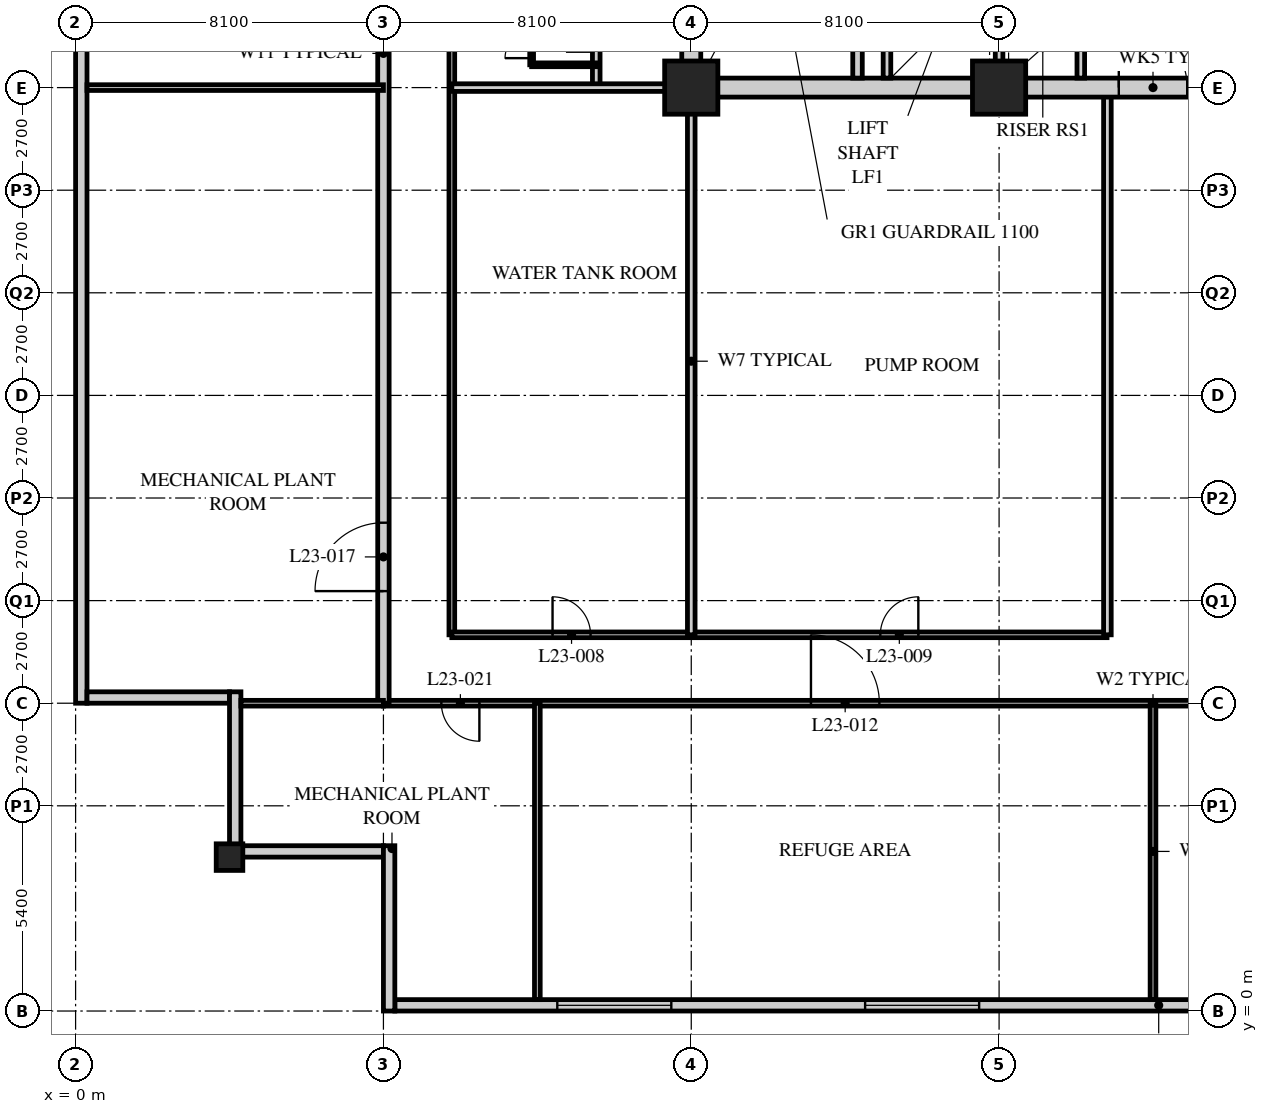
"""IFC4 building model, lengths in metres.
Left out: names, types, materials, properties, quantities, classifications, styles, units other than length and angle.
Written with IfcOpenShell. Run it as: python <this file> out.ifc"""

import sys

from ifc_helpers import new_model, si_unit, direction, frame, frame_2d, origin, origin_2d, place, context, subcontext, project, spatial, rectangle, hollow_rectangle, extrude, element, fill, save


model = new_model("IFC4")
c1 = context("Model", 3, precision=1e-05, world=origin(), true_north=direction((0.0, 1.0)))
c2 = subcontext(c1, "Body", "Model", "MODEL_VIEW")
j1 = project(units=[si_unit("LENGTHUNIT", "METRE"), si_unit("PLANEANGLEUNIT", "RADIAN")], contexts=[c1])
p1 = place(None, origin())
s1 = spatial("IfcSite", under=j1, at=p1, CompositionType="ELEMENT")
p2 = place(p1, origin())
s2 = spatial("IfcBuilding", under=s1, at=p2, CompositionType="ELEMENT")
p3 = place(p2, frame((0.0, 0.0, 90.8)))
s3 = spatial("IfcBuildingStorey", under=s2, at=p3, CompositionType="ELEMENT", Elevation=90.8)
p4 = place(p3, frame((4.05, 4.05, 0.0), z_axis=(0.0, 0.0, 1.0), x_axis=(1.0, 0.0, 0.0)))
e1 = element("IfcColumn", 1, at=p4, inside=s3, PredefinedType="COLUMN", context=c2, shape_type="SweptSolid", body=[
    extrude(hollow_rectangle(XDim=0.7, YDim=0.7, WallThickness=0.07, at=origin_2d()), origin(), (0.0, 0.0, 1.0), 7.2),
])
for number, where, z_axis, x_axis in (
    (2, (16.2, 24.3, 0.0), (0.0, 0.0, 1.0), (1.0, 0.0, 0.0)),
    (3, (24.3, 24.3, 0.0), (0.0, 0.0, 1.0), (1.0, 0.0, 0.0)),
):
    element("IfcColumn", number, at=place(p3, frame(where, z_axis=z_axis, x_axis=x_axis)), inside=s3, PredefinedType="COLUMN", context=c2, shape_type="SweptSolid", body=[
        extrude(hollow_rectangle(XDim=1.4, YDim=1.4, WallThickness=0.12, at=origin_2d()), origin(), (0.0, 0.0, 1.0), 7.2),
    ])
p5 = place(p3, frame((8.4, 0.15, 0.0), z_axis=(0.0, 0.0, 1.0), x_axis=(1.0, 0.0, 0.0)))
e4 = element("IfcWall", 4, at=p5, inside=s3, PredefinedType="SOLIDWALL", context=c2, shape_type="SweptSolid", body=[
    extrude(rectangle(XDim=40.2, YDim=0.3, at=frame_2d((20.1, 0.0))), origin(), (0.0, 0.0, 1.0), 5.85),
])
p6 = place(p5, frame((4.275, 0.0, 1.0)))
e5 = element("IfcOpeningElement", 5, at=p6, cuts=e4, PredefinedType="OPENING", context=c2, shape_type="SweptSolid", body=[
    extrude(rectangle(XDim=3.0, YDim=1.7, at=frame_2d((1.5, 0.85))), frame((0.0, 0.16, 0.0), z_axis=(0.0, -1.0, 0.0), x_axis=(1.0, 0.0, 0.0)), (0.0, 0.0, 1.0), 0.32),
])
p7 = place(p5, frame((12.375, 0.0, 1.0)))
e6 = element("IfcOpeningElement", 6, at=p7, cuts=e4, PredefinedType="OPENING", context=c2, shape_type="SweptSolid", body=[
    extrude(rectangle(XDim=3.0, YDim=1.7, at=frame_2d((1.5, 0.85))), frame((0.0, 0.16, 0.0), z_axis=(0.0, -1.0, 0.0), x_axis=(1.0, 0.0, 0.0)), (0.0, 0.0, 1.0), 0.32),
])
p8 = place(p5, frame((24.525, 0.0, 1.0)))
e7 = element("IfcOpeningElement", 7, at=p8, cuts=e4, PredefinedType="OPENING", context=c2, shape_type="SweptSolid", body=[
    extrude(rectangle(XDim=3.0, YDim=1.7, at=frame_2d((1.5, 0.85))), frame((0.0, 0.16, 0.0), z_axis=(0.0, -1.0, 0.0), x_axis=(1.0, 0.0, 0.0)), (0.0, 0.0, 1.0), 0.32),
])
p9 = place(p5, frame((32.625, 0.0, 1.0)))
e8 = element("IfcOpeningElement", 8, at=p9, cuts=e4, PredefinedType="OPENING", context=c2, shape_type="SweptSolid", body=[
    extrude(rectangle(XDim=3.0, YDim=1.7, at=frame_2d((1.5, 0.85))), frame((0.0, 0.16, 0.0), z_axis=(0.0, -1.0, 0.0), x_axis=(1.0, 0.0, 0.0)), (0.0, 0.0, 1.0), 0.32),
])
p10 = place(p3, frame((0.15, 40.2, 0.0), z_axis=(0.0, 0.0, 1.0), x_axis=(0.0, -1.0, 0.0)))
e9 = element("IfcWall", 9, at=p10, inside=s3, PredefinedType="SOLIDWALL", context=c2, shape_type="SweptSolid", body=[
    extrude(rectangle(XDim=32.1, YDim=0.3, at=frame_2d((16.05, 0.0))), origin(), (0.0, 0.0, 1.0), 5.85),
])
p11 = place(p3, frame((0.3, 8.25, 0.0), z_axis=(0.0, 0.0, 1.0), x_axis=(1.0, 0.0, 0.0)))
e10 = element("IfcWall", 10, at=p11, inside=s3, PredefinedType="SOLIDWALL", context=c2, shape_type="SweptSolid", body=[
    extrude(rectangle(XDim=3.75, YDim=0.3, at=frame_2d((1.875, 0.0))), origin(), (0.0, 0.0, 1.0), 6.95),
])
p12 = place(p3, frame((4.2, 8.4, 0.0), z_axis=(0.0, 0.0, 1.0), x_axis=(0.0, -1.0, 0.0)))
e11 = element("IfcWall", 11, at=p12, inside=s3, PredefinedType="SOLIDWALL", context=c2, shape_type="SweptSolid", body=[
    extrude(rectangle(XDim=4.35, YDim=0.3, at=frame_2d((2.175, 0.0))), origin(), (0.0, 0.0, 1.0), 6.25),
])
p13 = place(p3, frame((4.35, 4.2, 0.0), z_axis=(0.0, 0.0, 1.0), x_axis=(1.0, 0.0, 0.0)))
e12 = element("IfcWall", 12, at=p13, inside=s3, PredefinedType="SOLIDWALL", context=c2, shape_type="SweptSolid", body=[
    extrude(rectangle(XDim=3.75, YDim=0.3, at=frame_2d((1.875, 0.0))), origin(), (0.0, 0.0, 1.0), 6.25),
])
p14 = place(p3, frame((8.25, 4.35, 0.0), z_axis=(0.0, 0.0, 1.0), x_axis=(0.0, -1.0, 0.0)))
e13 = element("IfcWall", 13, at=p14, inside=s3, PredefinedType="SOLIDWALL", context=c2, shape_type="SweptSolid", body=[
    extrude(rectangle(XDim=4.35, YDim=0.3, at=frame_2d((2.175, 0.0))), origin(), (0.0, 0.0, 1.0), 5.85),
])
p15 = place(p3, frame((8.1, 8.1, 0.0), z_axis=(0.0, 0.0, 1.0), x_axis=(1.0, 0.0, 0.0)))
e14 = element("IfcWall", 14, at=p15, inside=s3, PredefinedType="PARTITIONING", context=c2, shape_type="SweptSolid", body=[
    extrude(rectangle(XDim=40.5, YDim=0.15, at=frame_2d((20.25, 0.0))), origin(), (0.0, 0.0, 1.0), 6.95),
])
p16 = place(p15, frame((11.25, 0.0, 0.0)))
e15 = element("IfcOpeningElement", 15, at=p16, cuts=e14, PredefinedType="OPENING", context=c2, shape_type="SweptSolid", body=[
    extrude(rectangle(XDim=1.8, YDim=2.4, at=frame_2d((0.9, 1.2))), frame((0.0, 0.085, 0.0), z_axis=(0.0, -1.0, 0.0), x_axis=(1.0, 0.0, 0.0)), (0.0, 0.0, 1.0), 0.17),
])
p17 = place(p15, frame((27.45, 0.0, 0.0)))
e16 = element("IfcOpeningElement", 16, at=p17, cuts=e14, PredefinedType="OPENING", context=c2, shape_type="SweptSolid", body=[
    extrude(rectangle(XDim=1.8, YDim=2.4, at=frame_2d((0.9, 1.2))), frame((0.0, 0.085, 0.0), z_axis=(0.0, -1.0, 0.0), x_axis=(1.0, 0.0, 0.0)), (0.0, 0.0, 1.0), 0.17),
])
p18 = place(p15, frame((1.525, 0.0, 0.0)))
e17 = element("IfcOpeningElement", 17, at=p18, cuts=e14, PredefinedType="OPENING", context=c2, shape_type="SweptSolid", body=[
    extrude(rectangle(XDim=1.0, YDim=2.1, at=frame_2d((0.5, 1.05))), frame((0.0, 0.085, 0.0), z_axis=(0.0, -1.0, 0.0), x_axis=(1.0, 0.0, 0.0)), (0.0, 0.0, 1.0), 0.17),
])
p19 = place(p15, frame((37.975, 0.0, 0.0)))
e18 = element("IfcOpeningElement", 18, at=p19, cuts=e14, PredefinedType="OPENING", context=c2, shape_type="SweptSolid", body=[
    extrude(rectangle(XDim=1.0, YDim=2.1, at=frame_2d((0.5, 1.05))), frame((0.0, 0.085, 0.0), z_axis=(0.0, -1.0, 0.0), x_axis=(1.0, 0.0, 0.0)), (0.0, 0.0, 1.0), 0.17),
])
p20 = place(p3, frame((8.1, 8.1, 0.0), z_axis=(0.0, 0.0, 1.0), x_axis=(0.0, 1.0, 0.0)))
e19 = element("IfcWall", 19, at=p20, inside=s3, PredefinedType="PARTITIONING", context=c2, shape_type="SweptSolid", body=[
    extrude(rectangle(XDim=34.2, YDim=0.3, at=frame_2d((17.1, 0.0))), origin(), (0.0, 0.0, 1.0), 5.85),
])
p21 = place(p20, frame((2.95, 0.0, 0.0)))
e20 = element("IfcOpeningElement", 20, at=p21, cuts=e19, PredefinedType="OPENING", context=c2, shape_type="SweptSolid", body=[
    extrude(rectangle(XDim=1.8, YDim=2.4, at=frame_2d((0.9, 1.2))), frame((0.0, 0.16, 0.0), z_axis=(0.0, -1.0, 0.0), x_axis=(1.0, 0.0, 0.0)), (0.0, 0.0, 1.0), 0.32),
])
p22 = place(p20, frame((27.3, 0.0, 0.0)))
e21 = element("IfcOpeningElement", 21, at=p22, cuts=e19, PredefinedType="OPENING", context=c2, shape_type="SweptSolid", body=[
    extrude(rectangle(XDim=1.8, YDim=2.4, at=frame_2d((0.9, 1.2))), frame((0.0, 0.16, 0.0), z_axis=(0.0, -1.0, 0.0), x_axis=(1.0, 0.0, 0.0)), (0.0, 0.0, 1.0), 0.32),
])
p23 = place(p3, frame((9.9, 40.5, 0.0), z_axis=(0.0, 0.0, 1.0), x_axis=(0.0, -1.0, 0.0)))
e22 = element("IfcWall", 22, at=p23, inside=s3, PredefinedType="PARTITIONING", context=c2, shape_type="SweptSolid", body=[
    extrude(rectangle(XDim=30.6, YDim=0.15, at=frame_2d((15.3, 0.0))), origin(), (0.0, 0.0, 1.0), 6.95),
])
p24 = place(p23, frame((13.975, 0.0, 0.0)))
e23 = element("IfcOpeningElement", 23, at=p24, cuts=e22, PredefinedType="OPENING", context=c2, shape_type="SweptSolid", body=[
    extrude(rectangle(XDim=0.85, YDim=2.1, at=frame_2d((0.425, 1.05))), frame((0.0, 0.085, 0.0), z_axis=(0.0, -1.0, 0.0), x_axis=(1.0, 0.0, 0.0)), (0.0, 0.0, 1.0), 0.17),
])
p25 = place(p23, frame((9.85, 0.0, 0.0)))
e24 = element("IfcOpeningElement", 24, at=p25, cuts=e22, PredefinedType="OPENING", context=c2, shape_type="SweptSolid", body=[
    extrude(rectangle(XDim=1.0, YDim=2.1, at=frame_2d((0.5, 1.05))), frame((0.0, 0.085, 0.0), z_axis=(0.0, -1.0, 0.0), x_axis=(1.0, 0.0, 0.0)), (0.0, 0.0, 1.0), 0.17),
])
p26 = place(p23, frame((5.875, 0.0, 0.0)))
e25 = element("IfcOpeningElement", 25, at=p26, cuts=e22, PredefinedType="OPENING", context=c2, shape_type="SweptSolid", body=[
    extrude(rectangle(XDim=0.85, YDim=2.1, at=frame_2d((0.425, 1.05))), frame((0.0, 0.085, 0.0), z_axis=(0.0, -1.0, 0.0), x_axis=(1.0, 0.0, 0.0)), (0.0, 0.0, 1.0), 0.17),
])
p27 = place(p23, frame((1.75, 0.0, 0.0)))
e26 = element("IfcOpeningElement", 26, at=p27, cuts=e22, PredefinedType="OPENING", context=c2, shape_type="SweptSolid", body=[
    extrude(rectangle(XDim=1.0, YDim=2.1, at=frame_2d((0.5, 1.05))), frame((0.0, 0.085, 0.0), z_axis=(0.0, -1.0, 0.0), x_axis=(1.0, 0.0, 0.0)), (0.0, 0.0, 1.0), 0.17),
])
p28 = place(p3, frame((9.9, 9.9, 0.0), z_axis=(0.0, 0.0, 1.0), x_axis=(1.0, 0.0, 0.0)))
e27 = element("IfcWall", 27, at=p28, inside=s3, PredefinedType="PARTITIONING", context=c2, shape_type="SweptSolid", body=[
    extrude(rectangle(XDim=17.24, YDim=0.15, at=frame_2d((8.62, 0.0))), origin(), (0.0, 0.0, 1.0), 6.95),
])
p29 = place(p28, frame((2.65, 0.0, 0.0)))
e28 = element("IfcOpeningElement", 28, at=p29, cuts=e27, PredefinedType="OPENING", context=c2, shape_type="SweptSolid", body=[
    extrude(rectangle(XDim=1.0, YDim=2.1, at=frame_2d((0.5, 1.05))), frame((0.0, 0.085, 0.0), z_axis=(0.0, -1.0, 0.0), x_axis=(1.0, 0.0, 0.0)), (0.0, 0.0, 1.0), 0.17),
])
p30 = place(p28, frame((11.275, 0.0, 0.0)))
e29 = element("IfcOpeningElement", 29, at=p30, cuts=e27, PredefinedType="OPENING", context=c2, shape_type="SweptSolid", body=[
    extrude(rectangle(XDim=1.0, YDim=2.1, at=frame_2d((0.5, 1.05))), frame((0.0, 0.085, 0.0), z_axis=(0.0, -1.0, 0.0), x_axis=(1.0, 0.0, 0.0)), (0.0, 0.0, 1.0), 0.17),
])
p31 = place(p3, frame((13.7, 24.3, 0.0), z_axis=(0.0, 0.0, 1.0), x_axis=(0.0, 1.0, 0.0)))
e30 = element("IfcWall", 30, at=p31, inside=s3, PredefinedType="SOLIDWALL", context=c2, shape_type="SweptSolid", body=[
    extrude(rectangle(XDim=3.6, YDim=0.2, at=frame_2d((1.8, 0.0))), origin(), (0.0, 0.0, 1.0), 6.95),
])
p32 = place(p3, frame((16.2, 9.9, 0.0), z_axis=(0.0, 0.0, 1.0), x_axis=(0.0, 1.0, 0.0)))
e31 = element("IfcWall", 31, at=p32, inside=s3, PredefinedType="SOLIDWALL", context=c2, shape_type="SweptSolid", body=[
    extrude(rectangle(XDim=14.4, YDim=0.2, at=frame_2d((7.2, 0.0))), origin(), (0.0, 0.0, 1.0), 5.85),
])
p33 = place(p3, frame((27.15, 9.9, 0.0), z_axis=(0.0, 0.0, 1.0), x_axis=(0.0, 1.0, 0.0)))
e32 = element("IfcWall", 32, at=p33, inside=s3, PredefinedType="SOLIDWALL", context=c2, shape_type="SweptSolid", body=[
    extrude(rectangle(XDim=14.4, YDim=0.2, at=frame_2d((7.2, 0.0))), origin(), (0.0, 0.0, 1.0), 6.95),
])
p34 = place(p3, frame((9.9, 24.3, 0.0), z_axis=(0.0, 0.0, 1.0), x_axis=(1.0, 0.0, 0.0)))
e33 = element("IfcWall", 33, at=p34, inside=s3, PredefinedType="SOLIDWALL", context=c2, shape_type="SweptSolid", body=[
    extrude(rectangle(XDim=6.3, YDim=0.2, at=frame_2d((3.15, 0.0))), origin(), (0.0, 0.0, 1.0), 5.85),
])
p35 = place(p3, frame((28.35, 8.1, 0.0), z_axis=(0.0, 0.0, 1.0), x_axis=(0.0, -1.0, 0.0)))
e34 = element("IfcWall", 34, at=p35, inside=s3, PredefinedType="PARTITIONING", context=c2, shape_type="SweptSolid", body=[
    extrude(rectangle(XDim=7.8, YDim=0.15, at=frame_2d((3.9, 0.0))), origin(), (0.0, 0.0, 1.0), 6.95),
])
p36 = place(p3, frame((8.1, 24.3, 0.0), z_axis=(0.0, 0.0, 1.0), x_axis=(-1.0, 0.0, 0.0)))
e35 = element("IfcWall", 35, at=p36, inside=s3, PredefinedType="PARTITIONING", context=c2, shape_type="SweptSolid", body=[
    extrude(rectangle(XDim=7.8, YDim=0.15, at=frame_2d((3.9, 0.0))), origin(), (0.0, 0.0, 1.0), 5.85),
])
p37 = place(p3, frame((4.35, 8.1, 0.0), z_axis=(0.0, 0.0, 1.0), x_axis=(1.0, 0.0, 0.0)))
e36 = element("IfcWall", 36, at=p37, inside=s3, PredefinedType="PARTITIONING", context=c2, shape_type="SweptSolid", body=[
    extrude(rectangle(XDim=3.75, YDim=0.15, at=frame_2d((1.875, 0.0))), origin(), (0.0, 0.0, 1.0), 6.95),
])
p38 = place(p3, frame((12.15, 8.1, 0.0), z_axis=(0.0, 0.0, 1.0), x_axis=(0.0, -1.0, 0.0)))
e37 = element("IfcWall", 37, at=p38, inside=s3, PredefinedType="PARTITIONING", context=c2, shape_type="SweptSolid", body=[
    extrude(rectangle(XDim=7.8, YDim=0.15, at=frame_2d((3.9, 0.0))), origin(), (0.0, 0.0, 1.0), 6.95),
])
p39 = place(p3, frame((12.0, 24.9, 0.0), z_axis=(0.0, 0.0, 1.0), x_axis=(0.0, 1.0, 0.0)))
e38 = element("IfcWall", 38, at=p39, inside=s3, PredefinedType="PARTITIONING", context=c2, shape_type="SweptSolid", body=[
    extrude(rectangle(XDim=1.05, YDim=0.1, at=frame_2d((0.525, 0.0))), origin(), (0.0, 0.0, 1.0), 6.95),
])
p40 = place(p39, frame((0.175, 0.0, 0.0)))
e39 = element("IfcOpeningElement", 39, at=p40, cuts=e38, PredefinedType="OPENING", context=c2, shape_type="SweptSolid", body=[
    extrude(rectangle(XDim=0.7, YDim=2.0, at=frame_2d((0.35, 1.0))), frame((0.0, 0.06, 0.0), z_axis=(0.0, -1.0, 0.0), x_axis=(1.0, 0.0, 0.0)), (0.0, 0.0, 1.0), 0.12),
])
p41 = place(p3, frame((12.0, 24.9, 0.0), z_axis=(0.0, 0.0, 1.0), x_axis=(1.0, 0.0, 0.0)))
e40 = element("IfcWall", 40, at=p41, inside=s3, PredefinedType="PARTITIONING", context=c2, shape_type="SweptSolid", body=[
    extrude(rectangle(XDim=1.7, YDim=0.1, at=frame_2d((0.85, 0.0))), origin(), (0.0, 0.0, 1.0), 6.95),
])
p42 = place(p3, frame((15.95, 24.3, 0.0), z_axis=(0.0, 0.0, 1.0), x_axis=(1.0, 0.0, 0.0)))
e41 = element("IfcWall", 41, at=p42, inside=s3, PredefinedType="SOLIDWALL", context=c2, shape_type="SweptSolid", body=[
    extrude(rectangle(XDim=24.8, YDim=0.5, at=frame_2d((12.4, 0.0))), origin(), (0.0, 0.0, 1.0), 6.188),
])
p43 = place(p42, frame((11.5, 0.0, 0.0)))
e42 = element("IfcOpeningElement", 42, at=p43, cuts=e41, PredefinedType="OPENING", context=c2, shape_type="SweptSolid", body=[
    extrude(rectangle(XDim=1.8, YDim=2.4, at=frame_2d((0.9, 1.2))), frame((0.0, 0.26, 0.0), z_axis=(0.0, -1.0, 0.0), x_axis=(1.0, 0.0, 0.0)), (0.0, 0.0, 1.0), 0.52),
])
p44 = place(p3, frame((16.2, 24.55, 0.0), z_axis=(0.0, 0.0, 1.0), x_axis=(0.0, 1.0, 0.0)))
e43 = element("IfcWall", 43, at=p44, inside=s3, PredefinedType="SOLIDWALL", context=c2, shape_type="SweptSolid", body=[
    extrude(rectangle(XDim=15.7, YDim=0.5, at=frame_2d((7.85, 0.0))), origin(), (0.0, 0.0, 1.0), 5.85),
])
p45 = place(p3, frame((24.3, 24.55, 0.0), z_axis=(0.0, 0.0, 1.0), x_axis=(0.0, 1.0, 0.0)))
e44 = element("IfcWall", 44, at=p45, inside=s3, PredefinedType="SOLIDWALL", context=c2, shape_type="SweptSolid", body=[
    extrude(rectangle(XDim=7.75, YDim=0.2, at=frame_2d((3.875, 0.0))), origin(), (0.0, 0.0, 1.0), 6.25),
])
p46 = place(p45, frame((4.6, 0.0, 0.0)))
e45 = element("IfcOpeningElement", 45, at=p46, cuts=e44, PredefinedType="OPENING", context=c2, shape_type="SweptSolid", body=[
    extrude(rectangle(XDim=1.2, YDim=2.1, at=frame_2d((0.6, 1.05))), frame((0.0, 0.11, 0.0), z_axis=(0.0, -1.0, 0.0), x_axis=(1.0, 0.0, 0.0)), (0.0, 0.0, 1.0), 0.22),
])
p47 = place(p3, frame((20.575, 24.55, 0.0), z_axis=(0.0, 0.0, 1.0), x_axis=(0.0, 1.0, 0.0)))
e46 = element("IfcWall", 46, at=p47, inside=s3, PredefinedType="SOLIDWALL", context=c2, shape_type="SweptSolid", body=[
    extrude(rectangle(XDim=7.75, YDim=0.25, at=frame_2d((3.875, 0.0))), origin(), (0.0, 0.0, 1.0), 6.95),
])
p48 = place(p47, frame((6.2, 0.0, 0.0)))
e47 = element("IfcOpeningElement", 47, at=p48, cuts=e46, PredefinedType="OPENING", context=c2, shape_type="SweptSolid", body=[
    extrude(rectangle(XDim=1.2, YDim=2.1, at=frame_2d((0.6, 1.05))), frame((0.0, 0.135, 0.0), z_axis=(0.0, -1.0, 0.0), x_axis=(1.0, 0.0, 0.0)), (0.0, 0.0, 1.0), 0.27),
])
p49 = place(p3, frame((21.35, 24.55, 0.0), z_axis=(0.0, 0.0, 1.0), x_axis=(0.0, 1.0, 0.0)))
e48 = element("IfcWall", 48, at=p49, inside=s3, PredefinedType="SOLIDWALL", context=c2, shape_type="SweptSolid", body=[
    extrude(rectangle(XDim=2.6, YDim=0.2, at=frame_2d((1.3, 0.0))), origin(), (0.0, 0.0, 1.0), 6.95),
])
p50 = place(p3, frame((26.45, 24.55, 0.0), z_axis=(0.0, 0.0, 1.0), x_axis=(0.0, 1.0, 0.0)))
e49 = element("IfcWall", 49, at=p50, inside=s3, PredefinedType="SOLIDWALL", context=c2, shape_type="SweptSolid", body=[
    extrude(rectangle(XDim=1.6, YDim=0.2, at=frame_2d((0.8, 0.0))), origin(), (0.0, 0.0, 1.0), 6.95),
])
p51 = place(p6, origin())
e50 = element("IfcWindow", 50, at=p51, inside=s3, PartitioningType="SINGLE_PANEL", PredefinedType="USERDEFINED", context=c2, shape_type="SweptSolid", body=[
    extrude(rectangle(XDim=3.0, YDim=1.7, at=frame_2d((1.5, 0.85))), frame((0.0, 0.075, 0.0), z_axis=(0.0, -1.0, 0.0), x_axis=(1.0, 0.0, 0.0)), (0.0, 0.0, 1.0), 0.15),
])
fill(e5, e50)
p52 = place(p7, origin())
e51 = element("IfcWindow", 51, at=p52, inside=s3, PartitioningType="SINGLE_PANEL", PredefinedType="USERDEFINED", context=c2, shape_type="SweptSolid", body=[
    extrude(rectangle(XDim=3.0, YDim=1.7, at=frame_2d((1.5, 0.85))), frame((0.0, 0.075, 0.0), z_axis=(0.0, -1.0, 0.0), x_axis=(1.0, 0.0, 0.0)), (0.0, 0.0, 1.0), 0.15),
])
fill(e6, e51)
p53 = place(p29, origin())
e52 = element("IfcDoor", 52, at=p53, inside=s3, OperationType="SINGLE_SWING_LEFT", PredefinedType="DOOR", context=c2, shape_type="SweptSolid", body=[
    extrude(rectangle(XDim=1.0, YDim=2.1, at=frame_2d((0.5, 1.05))), frame((0.0, 0.025, 0.0), z_axis=(0.0, -1.0, 0.0), x_axis=(1.0, 0.0, 0.0)), (0.0, 0.0, 1.0), 0.05),
])
fill(e28, e52)
p54 = place(p30, origin())
e53 = element("IfcDoor", 53, at=p54, inside=s3, OperationType="SINGLE_SWING_RIGHT", PredefinedType="DOOR", context=c2, shape_type="SweptSolid", body=[
    extrude(rectangle(XDim=1.0, YDim=2.1, at=frame_2d((0.5, 1.05))), frame((0.0, 0.025, 0.0), z_axis=(0.0, -1.0, 0.0), x_axis=(1.0, 0.0, 0.0)), (0.0, 0.0, 1.0), 0.05),
])
fill(e29, e53)
p55 = place(p16, origin())
e54 = element("IfcDoor", 54, at=p55, inside=s3, OperationType="DOUBLE_DOOR_SINGLE_SWING", PredefinedType="DOOR", context=c2, shape_type="SweptSolid", body=[
    extrude(rectangle(XDim=1.8, YDim=2.4, at=frame_2d((0.9, 1.2))), frame((0.0, 0.025, 0.0), z_axis=(0.0, -1.0, 0.0), x_axis=(1.0, 0.0, 0.0)), (0.0, 0.0, 1.0), 0.05),
])
fill(e15, e54)
p56 = place(p21, origin())
e55 = element("IfcDoor", 55, at=p56, inside=s3, OperationType="DOUBLE_DOOR_SINGLE_SWING", PredefinedType="DOOR", context=c2, shape_type="SweptSolid", body=[
    extrude(rectangle(XDim=1.8, YDim=2.4, at=frame_2d((0.9, 1.2))), frame((0.0, 0.025, 0.0), z_axis=(0.0, -1.0, 0.0), x_axis=(1.0, 0.0, 0.0)), (0.0, 0.0, 1.0), 0.05),
])
fill(e20, e55)
p57 = place(p18, origin())
e56 = element("IfcDoor", 56, at=p57, inside=s3, OperationType="SINGLE_SWING_LEFT", PredefinedType="DOOR", context=c2, shape_type="SweptSolid", body=[
    extrude(rectangle(XDim=1.0, YDim=2.1, at=frame_2d((0.5, 1.05))), frame((0.0, 0.025, 0.0), z_axis=(0.0, -1.0, 0.0), x_axis=(1.0, 0.0, 0.0)), (0.0, 0.0, 1.0), 0.05),
])
fill(e17, e56)
p58 = place(p40, origin())
e57 = element("IfcDoor", 57, at=p58, inside=s3, OperationType="SINGLE_SWING_LEFT", PredefinedType="DOOR", context=c2, shape_type="SweptSolid", body=[
    extrude(rectangle(XDim=0.7, YDim=2.0, at=frame_2d((0.35, 1.0))), frame((0.0, 0.025, 0.0), z_axis=(0.0, -1.0, 0.0), x_axis=(1.0, 0.0, 0.0)), (0.0, 0.0, 1.0), 0.05),
])
fill(e39, e57)
p59 = place(p43, origin())
e58 = element("IfcDoor", 58, at=p59, inside=s3, OperationType="DOUBLE_DOOR_SINGLE_SWING", PredefinedType="DOOR", context=c2, shape_type="SweptSolid", body=[
    extrude(rectangle(XDim=1.8, YDim=2.4, at=frame_2d((0.9, 1.2))), frame((0.0, 0.025, 0.0), z_axis=(0.0, -1.0, 0.0), x_axis=(1.0, 0.0, 0.0)), (0.0, 0.0, 1.0), 0.05),
])
fill(e42, e58)
save(model, sys.argv[1])
